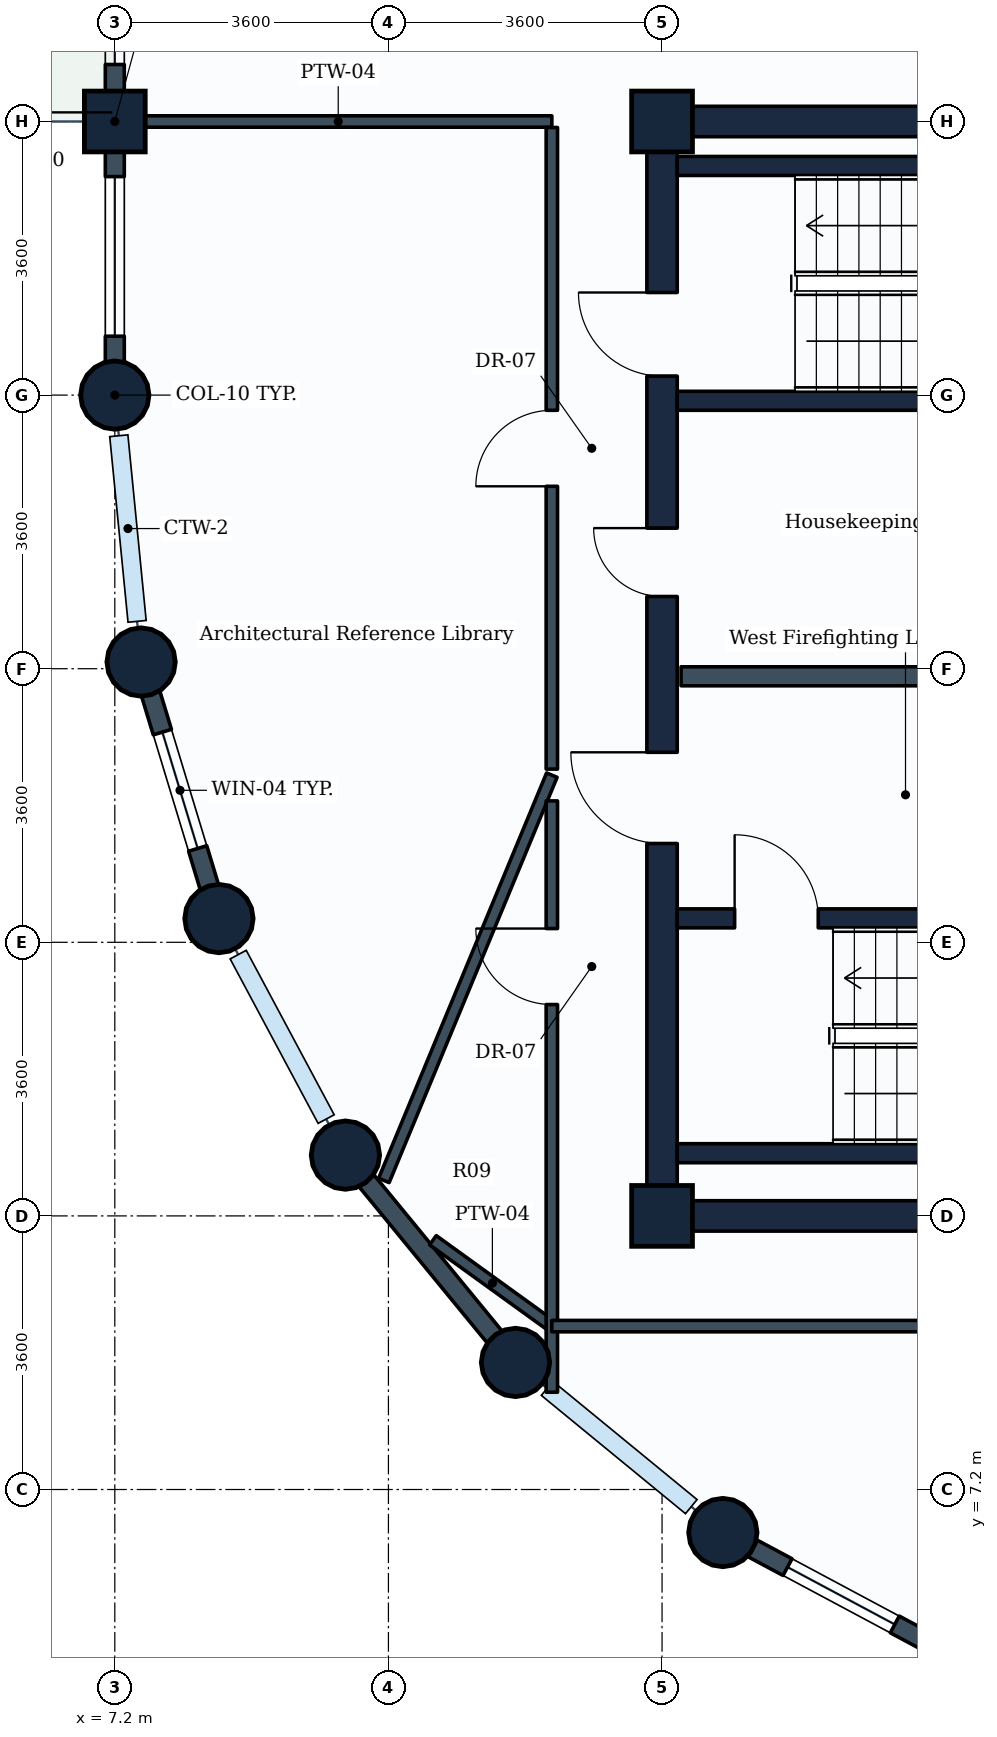
"""IFC4 building model, lengths in metres.
Left out: names, types, materials, properties, quantities, classifications, styles, units other than length and angle.
Written with IfcOpenShell. Run it as: python <this file> out.ifc"""

import sys

from ifc_helpers import new_model, si_unit, direction, frame, frame_2d, origin, origin_2d, place, context, subcontext, project, spatial, rectangle, circle, extrude, element, fill, save


model = new_model("IFC4")
c1 = context("Model", 3, precision=1e-05, world=origin(), true_north=direction((0.0, 1.0)))
c2 = subcontext(c1, "Body", "Model", "MODEL_VIEW")
j1 = project(units=[si_unit("LENGTHUNIT", "METRE"), si_unit("PLANEANGLEUNIT", "RADIAN")], contexts=[c1])
p1 = place(None, origin())
s1 = spatial("IfcSite", under=j1, at=p1, CompositionType="ELEMENT")
p2 = place(p1, origin())
s2 = spatial("IfcBuilding", under=s1, at=p2, CompositionType="ELEMENT")
p3 = place(p2, frame((0.0, 0.0, 263.0)))
s3 = spatial("IfcBuildingStorey", under=s2, at=p3, CompositionType="ELEMENT", Elevation=263.0)
p4 = place(p3, frame((7.2, 21.6, 0.0), z_axis=(0.0, 0.0, 1.0), x_axis=(1.0, 0.0, 0.0)))
e1 = element("IfcColumn", 1, at=p4, inside=s3, PredefinedType="COLUMN", context=c2, shape_type="SweptSolid", body=[
    extrude(circle(Radius=0.45, at=origin_2d()), origin(), (0.0, 0.0, 1.0), 3.6),
])
p5 = place(p3, frame((7.2, 25.2, 0.0), z_axis=(0.0, 0.0, 1.0), x_axis=(0.0, 1.0, 0.0)))
e2 = element("IfcColumn", 2, at=p5, inside=s3, PredefinedType="COLUMN", context=c2, shape_type="SweptSolid", body=[
    extrude(rectangle(XDim=0.8, YDim=0.8, at=origin_2d()), origin(), (0.0, 0.0, 1.0), 3.6),
])
for number, where, z_axis, x_axis in (
    (3, (7.546, 18.088, 0.0), (0.0, 0.0, 1.0), (1.0, 0.0, 0.0)),
    (4, (8.57, 14.712, 0.0), (0.0, 0.0, 1.0), (1.0, 0.0, 0.0)),
    (5, (10.234, 11.6, 0.0), (0.0, 0.0, 1.0), (1.0, 0.0, 0.0)),
    (6, (12.472, 8.872, 0.0), (0.0, 0.0, 1.0), (1.0, 0.0, 0.0)),
):
    element("IfcColumn", number, at=place(p3, frame(where, z_axis=z_axis, x_axis=x_axis)), inside=s3, PredefinedType="COLUMN", context=c2, shape_type="SweptSolid", body=[
        extrude(circle(Radius=0.45, at=origin_2d()), origin(), (0.0, 0.0, 1.0), 3.6),
    ])
for number, where, z_axis, x_axis in (
    (7, (14.4, 10.8, 0.0), (0.0, 0.0, 1.0), (1.0, 0.0, 0.0)),
    (8, (14.4, 25.2, 0.0), (0.0, 0.0, 1.0), (1.0, 0.0, 0.0)),
):
    element("IfcColumn", number, at=place(p3, frame(where, z_axis=z_axis, x_axis=x_axis)), inside=s3, PredefinedType="COLUMN", context=c2, shape_type="SweptSolid", body=[
        extrude(rectangle(XDim=0.8, YDim=0.8, at=origin_2d()), origin(), (0.0, 0.0, 1.0), 3.6),
    ])
p6 = place(p3, frame((15.2, 6.634, 0.0), z_axis=(0.0, 0.0, 1.0), x_axis=(1.0, 0.0, 0.0)))
e9 = element("IfcColumn", 9, at=p6, inside=s3, PredefinedType="COLUMN", context=c2, shape_type="SweptSolid", body=[
    extrude(circle(Radius=0.45, at=origin_2d()), origin(), (0.0, 0.0, 1.0), 3.6),
])
p7 = place(p3, frame((7.2, 25.2, 0.0), z_axis=(0.0, 0.0, 1.0), x_axis=(0.0, 1.0, 0.0)))
e10 = element("IfcWall", 10, at=p7, inside=s3, PredefinedType="STANDARD", context=c2, shape_type="SweptSolid", body=[
    extrude(rectangle(XDim=3.6, YDim=0.25, at=frame_2d((1.8, 0.0))), origin(), (0.0, 0.0, 1.0), 2.83),
])
p8 = place(p7, frame((0.75, 0.0, 0.85)))
e11 = element("IfcOpeningElement", 11, at=p8, cuts=e10, PredefinedType="OPENING", context=c2, shape_type="SweptSolid", body=[
    extrude(rectangle(XDim=2.1, YDim=1.35, at=frame_2d((1.05, 0.675))), frame((0.0, 0.135, 0.0), z_axis=(0.0, -1.0, 0.0), x_axis=(1.0, 0.0, 0.0)), (0.0, 0.0, 1.0), 0.27),
])
p9 = place(p3, frame((7.2, 21.6, 0.0), z_axis=(0.0, 0.0, 1.0), x_axis=(0.0, 1.0, 0.0)))
e12 = element("IfcWall", 12, at=p9, inside=s3, PredefinedType="STANDARD", context=c2, shape_type="SweptSolid", body=[
    extrude(rectangle(XDim=3.6, YDim=0.25, at=frame_2d((1.8, 0.0))), origin(), (0.0, 0.0, 1.0), 2.83),
])
p10 = place(p9, frame((0.775, 0.0, 0.85)))
e13 = element("IfcOpeningElement", 13, at=p10, cuts=e12, PredefinedType="OPENING", context=c2, shape_type="SweptSolid", body=[
    extrude(rectangle(XDim=2.1, YDim=1.35, at=frame_2d((1.05, 0.675))), frame((0.0, 0.135, 0.0), z_axis=(0.0, -1.0, 0.0), x_axis=(1.0, 0.0, 0.0)), (0.0, 0.0, 1.0), 0.27),
])
p11 = place(p3, frame((8.57, 14.712, 0.0), z_axis=(0.0, 0.0, 1.0), x_axis=(-0.290305086481, 0.956934144423, 0.0)))
e14 = element("IfcWall", 14, at=p11, inside=s3, PredefinedType="STANDARD", context=c2, shape_type="SweptSolid", body=[
    extrude(rectangle(XDim=3.528, YDim=0.25, at=frame_2d((1.764, 0.0))), origin(), (0.0, 0.0, 1.0), 2.83),
])
p12 = place(p11, frame((0.964, 0.0, 0.85)))
e15 = element("IfcOpeningElement", 15, at=p12, cuts=e14, PredefinedType="OPENING", context=c2, shape_type="SweptSolid", body=[
    extrude(rectangle(XDim=1.6, YDim=1.35, at=frame_2d((0.8, 0.675))), frame((0.0, 0.135, 0.0), z_axis=(0.0, -1.0, 0.0), x_axis=(1.0, 0.0, 0.0)), (0.0, 0.0, 1.0), 0.27),
])
p13 = place(p3, frame((12.472, 8.872, 0.0), z_axis=(0.0, 0.0, 1.0), x_axis=(-0.634258295121, 0.773121216285, 0.0)))
e16 = element("IfcWall", 16, at=p13, inside=s3, PredefinedType="STANDARD", context=c2, shape_type="SweptSolid", body=[
    extrude(rectangle(XDim=3.529, YDim=0.25, at=frame_2d((1.764, 0.0))), origin(), (0.0, 0.0, 1.0), 2.83),
])
p14 = place(p3, frame((18.312, 4.97, 0.0), z_axis=(0.0, 0.0, 1.0), x_axis=(-0.881846862014, 0.471535907389, 0.0)))
e17 = element("IfcWall", 17, at=p14, inside=s3, PredefinedType="STANDARD", context=c2, shape_type="SweptSolid", body=[
    extrude(rectangle(XDim=3.529, YDim=0.25, at=frame_2d((1.765, 0.0))), origin(), (0.0, 0.0, 1.0), 2.83),
])
p15 = place(p14, frame((0.964, 0.0, 0.85)))
e18 = element("IfcOpeningElement", 18, at=p15, cuts=e17, PredefinedType="OPENING", context=c2, shape_type="SweptSolid", body=[
    extrude(rectangle(XDim=1.6, YDim=1.35, at=frame_2d((0.8, 0.675))), frame((0.0, 0.135, 0.0), z_axis=(0.0, -1.0, 0.0), x_axis=(1.0, 0.0, 0.0)), (0.0, 0.0, 1.0), 0.27),
])
p16 = place(p3, frame((14.4, 10.8, 0.0), z_axis=(0.0, 0.0, 1.0), x_axis=(1.0, 0.0, 0.0)))
e19 = element("IfcWall", 19, at=p16, inside=s3, PredefinedType="SHEAR", context=c2, shape_type="SweptSolid", body=[
    extrude(rectangle(XDim=18.0, YDim=0.4, at=frame_2d((9.0, 0.0))), origin(), (0.0, 0.0, 1.0), 3.35),
])
p17 = place(p3, frame((14.4, 25.2, 0.0), z_axis=(0.0, 0.0, 1.0), x_axis=(1.0, 0.0, 0.0)))
e20 = element("IfcWall", 20, at=p17, inside=s3, PredefinedType="SHEAR", context=c2, shape_type="SweptSolid", body=[
    extrude(rectangle(XDim=10.8, YDim=0.4, at=frame_2d((5.4, 0.0))), origin(), (0.0, 0.0, 1.0), 3.35),
])
p18 = place(p3, frame((14.4, 10.8, 0.0), z_axis=(0.0, 0.0, 1.0), x_axis=(0.0, 1.0, 0.0)))
e21 = element("IfcWall", 21, at=p18, inside=s3, PredefinedType="SHEAR", context=c2, shape_type="SweptSolid", body=[
    extrude(rectangle(XDim=14.4, YDim=0.4, at=frame_2d((7.2, 0.0))), origin(), (0.0, 0.0, 1.0), 3.35),
])
p19 = place(p18, frame((11.05, 0.0, 0.0)))
e22 = element("IfcOpeningElement", 22, at=p19, cuts=e21, PredefinedType="OPENING", context=c2, shape_type="SweptSolid", body=[
    extrude(rectangle(XDim=1.1, YDim=2.1, at=frame_2d((0.55, 1.05))), frame((0.0, 0.21, 0.0), z_axis=(0.0, -1.0, 0.0), x_axis=(1.0, 0.0, 0.0)), (0.0, 0.0, 1.0), 0.42),
])
p20 = place(p18, frame((4.9, 0.0, 0.0)))
e23 = element("IfcOpeningElement", 23, at=p20, cuts=e21, PredefinedType="OPENING", context=c2, shape_type="SweptSolid", body=[
    extrude(rectangle(XDim=1.2, YDim=2.1, at=frame_2d((0.6, 1.05))), frame((0.0, 0.21, 0.0), z_axis=(0.0, -1.0, 0.0), x_axis=(1.0, 0.0, 0.0)), (0.0, 0.0, 1.0), 0.42),
])
p21 = place(p18, frame((8.15, 0.0, 0.0)))
e24 = element("IfcOpeningElement", 24, at=p21, cuts=e21, PredefinedType="OPENING", context=c2, shape_type="SweptSolid", body=[
    extrude(rectangle(XDim=0.9, YDim=2.1, at=frame_2d((0.45, 1.05))), frame((0.0, 0.21, 0.0), z_axis=(0.0, -1.0, 0.0), x_axis=(1.0, 0.0, 0.0)), (0.0, 0.0, 1.0), 0.42),
])
p22 = place(p3, frame((14.6, 11.625, 0.0), z_axis=(0.0, 0.0, 1.0), x_axis=(1.0, 0.0, 0.0)))
e25 = element("IfcWall", 25, at=p22, inside=s3, PredefinedType="SHEAR", context=c2, shape_type="SweptSolid", body=[
    extrude(rectangle(XDim=8.75, YDim=0.25, at=frame_2d((4.375, 0.0))), origin(), (0.0, 0.0, 1.0), 3.35),
])
p23 = place(p3, frame((14.6, 14.715, 0.0), z_axis=(0.0, 0.0, 1.0), x_axis=(1.0, 0.0, 0.0)))
e26 = element("IfcWall", 26, at=p23, inside=s3, PredefinedType="SHEAR", context=c2, shape_type="SweptSolid", body=[
    extrude(rectangle(XDim=8.75, YDim=0.25, at=frame_2d((4.375, 0.0))), origin(), (0.0, 0.0, 1.0), 3.35),
])
p24 = place(p23, frame((0.755, 0.0, 0.0)))
e27 = element("IfcOpeningElement", 27, at=p24, cuts=e26, PredefinedType="OPENING", context=c2, shape_type="SweptSolid", body=[
    extrude(rectangle(XDim=1.1, YDim=2.1, at=frame_2d((0.55, 1.05))), frame((0.0, 0.135, 0.0), z_axis=(0.0, -1.0, 0.0), x_axis=(1.0, 0.0, 0.0)), (0.0, 0.0, 1.0), 0.27),
])
for number, where, z_axis, x_axis in (
    (28, (14.6, 21.525, 0.0), (0.0, 0.0, 1.0), (1.0, 0.0, 0.0)),
    (29, (14.6, 24.615, 0.0), (0.0, 0.0, 1.0), (1.0, 0.0, 0.0)),
):
    element("IfcWall", number, at=place(p3, frame(where, z_axis=z_axis, x_axis=x_axis)), inside=s3, PredefinedType="SHEAR", context=c2, shape_type="SweptSolid", body=[
        extrude(rectangle(XDim=8.3, YDim=0.25, at=frame_2d((4.15, 0.0))), origin(), (0.0, 0.0, 1.0), 3.35),
    ])
p25 = place(p3, frame((14.65, 17.9, 0.0), z_axis=(0.0, 0.0, 1.0), x_axis=(1.0, 0.0, 0.0)))
e30 = element("IfcWall", 30, at=p25, inside=s3, PredefinedType="PARTITIONING", context=c2, shape_type="SweptSolid", body=[
    extrude(rectangle(XDim=7.15, YDim=0.25, at=frame_2d((3.575, 0.0))), origin(), (0.0, 0.0, 1.0), 3.335),
])
p26 = place(p3, frame((7.329, 25.2, 0.0), z_axis=(0.0, 0.0, 1.0), x_axis=(1.0, 0.0, 0.0)))
e31 = element("IfcWall", 31, at=p26, inside=s3, PredefinedType="PARTITIONING", context=c2, shape_type="SweptSolid", body=[
    extrude(rectangle(XDim=5.621, YDim=0.15, at=frame_2d((2.811, 0.0))), origin(), (0.0, 0.0, 1.0), 3.335),
])
p27 = place(p3, frame((12.95, 9.35, 0.0), z_axis=(0.0, 0.0, 1.0), x_axis=(-0.8106792284, 0.585490553844, 0.0)))
e32 = element("IfcWall", 32, at=p27, inside=s3, PredefinedType="PARTITIONING", context=c2, shape_type="SweptSolid", body=[
    extrude(rectangle(XDim=1.93, YDim=0.15, at=frame_2d((0.965, 0.0))), origin(), (0.0, 0.0, 1.0), 2.83),
])
p28 = place(p3, frame((12.95, 16.6, 0.0), z_axis=(0.0, 0.0, 1.0), x_axis=(-0.382758890427, -0.923848273148, 0.0)))
e33 = element("IfcWall", 33, at=p28, inside=s3, PredefinedType="PARTITIONING", context=c2, shape_type="SweptSolid", body=[
    extrude(rectangle(XDim=5.773, YDim=0.15, at=frame_2d((2.887, 0.0))), origin(), (0.0, 0.0, 1.0), 2.83),
])
p29 = place(p3, frame((12.95, 16.679, 0.0), z_axis=(0.0, 0.0, 1.0), x_axis=(0.0, 1.0, 0.0)))
e34 = element("IfcWall", 34, at=p29, inside=s3, PredefinedType="PARTITIONING", context=c2, shape_type="SweptSolid", body=[
    extrude(rectangle(XDim=8.442, YDim=0.15, at=frame_2d((4.221, 0.0))), origin(), (0.0, 0.0, 1.0), 3.02),
])
p30 = place(p29, frame((3.721, 0.0, 0.0)))
e35 = element("IfcOpeningElement", 35, at=p30, cuts=e34, PredefinedType="OPENING", context=c2, shape_type="SweptSolid", body=[
    extrude(rectangle(XDim=1.0, YDim=2.1, at=frame_2d((0.5, 1.05))), frame((0.0, 0.085, 0.0), z_axis=(0.0, -1.0, 0.0), x_axis=(1.0, 0.0, 0.0)), (0.0, 0.0, 1.0), 0.17),
])
p31 = place(p3, frame((12.95, 8.48, 0.0), z_axis=(0.0, 0.0, 1.0), x_axis=(0.0, 1.0, 0.0)))
e36 = element("IfcWall", 36, at=p31, inside=s3, PredefinedType="PARTITIONING", context=c2, shape_type="SweptSolid", body=[
    extrude(rectangle(XDim=7.781, YDim=0.15, at=frame_2d((3.89, 0.0))), origin(), (0.0, 0.0, 1.0), 2.83),
])
p32 = place(p31, frame((5.101, 0.0, 0.0)))
e37 = element("IfcOpeningElement", 37, at=p32, cuts=e36, PredefinedType="OPENING", context=c2, shape_type="SweptSolid", body=[
    extrude(rectangle(XDim=1.0, YDim=2.1, at=frame_2d((0.5, 1.05))), frame((0.0, 0.085, 0.0), z_axis=(0.0, -1.0, 0.0), x_axis=(1.0, 0.0, 0.0)), (0.0, 0.0, 1.0), 0.17),
])
p33 = place(p3, frame((12.95, 9.35, 0.0), z_axis=(0.0, 0.0, 1.0), x_axis=(1.0, 0.0, 0.0)))
e38 = element("IfcWall", 38, at=p33, inside=s3, PredefinedType="PARTITIONING", context=c2, shape_type="SweptSolid", body=[
    extrude(rectangle(XDim=15.771, YDim=0.15, at=frame_2d((7.885, 0.0))), origin(), (0.0, 0.0, 1.0), 3.02),
])
p34 = place(p33, frame((4.836, 0.0, 0.0)))
e39 = element("IfcOpeningElement", 39, at=p34, cuts=e38, PredefinedType="OPENING", context=c2, shape_type="SweptSolid", body=[
    extrude(rectangle(XDim=1.0, YDim=2.1, at=frame_2d((0.5, 1.05))), frame((0.0, 0.085, 0.0), z_axis=(0.0, -1.0, 0.0), x_axis=(1.0, 0.0, 0.0)), (0.0, 0.0, 1.0), 0.17),
])
p35 = place(p8, origin())
e40 = element("IfcWindow", 40, at=p35, inside=s3, PartitioningType="SINGLE_PANEL", PredefinedType="WINDOW", context=c2, shape_type="SweptSolid", body=[
    extrude(rectangle(XDim=2.1, YDim=1.35, at=frame_2d((1.05, 0.675))), frame((0.0, 0.03, 0.0), z_axis=(0.0, -1.0, 0.0), x_axis=(1.0, 0.0, 0.0)), (0.0, 0.0, 1.0), 0.06),
])
fill(e11, e40)
p36 = place(p10, origin())
e41 = element("IfcWindow", 41, at=p36, inside=s3, PartitioningType="SINGLE_PANEL", PredefinedType="WINDOW", context=c2, shape_type="SweptSolid", body=[
    extrude(rectangle(XDim=2.1, YDim=1.35, at=frame_2d((1.05, 0.675))), frame((0.0, 0.03, 0.0), z_axis=(0.0, -1.0, 0.0), x_axis=(1.0, 0.0, 0.0)), (0.0, 0.0, 1.0), 0.06),
])
fill(e13, e41)
p37 = place(p12, origin())
e42 = element("IfcWindow", 42, at=p37, inside=s3, PartitioningType="SINGLE_PANEL", PredefinedType="WINDOW", context=c2, shape_type="SweptSolid", body=[
    extrude(rectangle(XDim=1.6, YDim=1.35, at=frame_2d((0.8, 0.675))), frame((0.0, 0.03, 0.0), z_axis=(0.0, -1.0, 0.0), x_axis=(1.0, 0.0, 0.0)), (0.0, 0.0, 1.0), 0.06),
])
fill(e15, e42)
p38 = place(p15, origin())
e43 = element("IfcWindow", 43, at=p38, inside=s3, PartitioningType="SINGLE_PANEL", PredefinedType="WINDOW", context=c2, shape_type="SweptSolid", body=[
    extrude(rectangle(XDim=1.6, YDim=1.35, at=frame_2d((0.8, 0.675))), frame((0.0, 0.03, 0.0), z_axis=(0.0, -1.0, 0.0), x_axis=(1.0, 0.0, 0.0)), (0.0, 0.0, 1.0), 0.06),
])
fill(e18, e43)
p39 = place(p24, origin())
e44 = element("IfcDoor", 44, at=p39, inside=s3, OperationType="SINGLE_SWING_LEFT", PredefinedType="DOOR", context=c2, shape_type="SweptSolid", body=[
    extrude(rectangle(XDim=1.1, YDim=2.1, at=frame_2d((0.55, 1.05))), frame((0.0, 0.025, 0.0), z_axis=(0.0, -1.0, 0.0), x_axis=(1.0, 0.0, 0.0)), (0.0, 0.0, 1.0), 0.05),
])
fill(e27, e44)
p40 = place(p19, origin())
e45 = element("IfcDoor", 45, at=p40, inside=s3, OperationType="SINGLE_SWING_RIGHT", PredefinedType="DOOR", context=c2, shape_type="SweptSolid", body=[
    extrude(rectangle(XDim=1.1, YDim=2.1, at=frame_2d((0.55, 1.05))), frame((0.0, 0.025, 0.0), z_axis=(0.0, -1.0, 0.0), x_axis=(1.0, 0.0, 0.0)), (0.0, 0.0, 1.0), 0.05),
])
fill(e22, e45)
p41 = place(p20, origin())
e46 = element("IfcDoor", 46, at=p41, inside=s3, OperationType="SINGLE_SWING_RIGHT", PredefinedType="DOOR", context=c2, shape_type="SweptSolid", body=[
    extrude(rectangle(XDim=1.2, YDim=2.1, at=frame_2d((0.6, 1.05))), frame((0.0, 0.025, 0.0), z_axis=(0.0, -1.0, 0.0), x_axis=(1.0, 0.0, 0.0)), (0.0, 0.0, 1.0), 0.05),
])
fill(e23, e46)
p42 = place(p21, origin())
e47 = element("IfcDoor", 47, at=p42, inside=s3, OperationType="SINGLE_SWING_RIGHT", PredefinedType="DOOR", context=c2, shape_type="SweptSolid", body=[
    extrude(rectangle(XDim=0.9, YDim=2.1, at=frame_2d((0.45, 1.05))), frame((0.0, 0.025, 0.0), z_axis=(0.0, -1.0, 0.0), x_axis=(1.0, 0.0, 0.0)), (0.0, 0.0, 1.0), 0.05),
])
fill(e24, e47)
p43 = place(p30, origin())
e48 = element("IfcDoor", 48, at=p43, inside=s3, OperationType="SINGLE_SWING_LEFT", PredefinedType="DOOR", context=c2, shape_type="SweptSolid", body=[
    extrude(rectangle(XDim=1.0, YDim=2.1, at=frame_2d((0.5, 1.05))), frame((0.0, 0.025, 0.0), z_axis=(0.0, -1.0, 0.0), x_axis=(1.0, 0.0, 0.0)), (0.0, 0.0, 1.0), 0.05),
])
fill(e35, e48)
p44 = place(p32, origin())
e49 = element("IfcDoor", 49, at=p44, inside=s3, OperationType="SINGLE_SWING_RIGHT", PredefinedType="DOOR", context=c2, shape_type="SweptSolid", body=[
    extrude(rectangle(XDim=1.0, YDim=2.1, at=frame_2d((0.5, 1.05))), frame((0.0, 0.025, 0.0), z_axis=(0.0, -1.0, 0.0), x_axis=(1.0, 0.0, 0.0)), (0.0, 0.0, 1.0), 0.05),
])
fill(e37, e49)
save(model, sys.argv[1])
